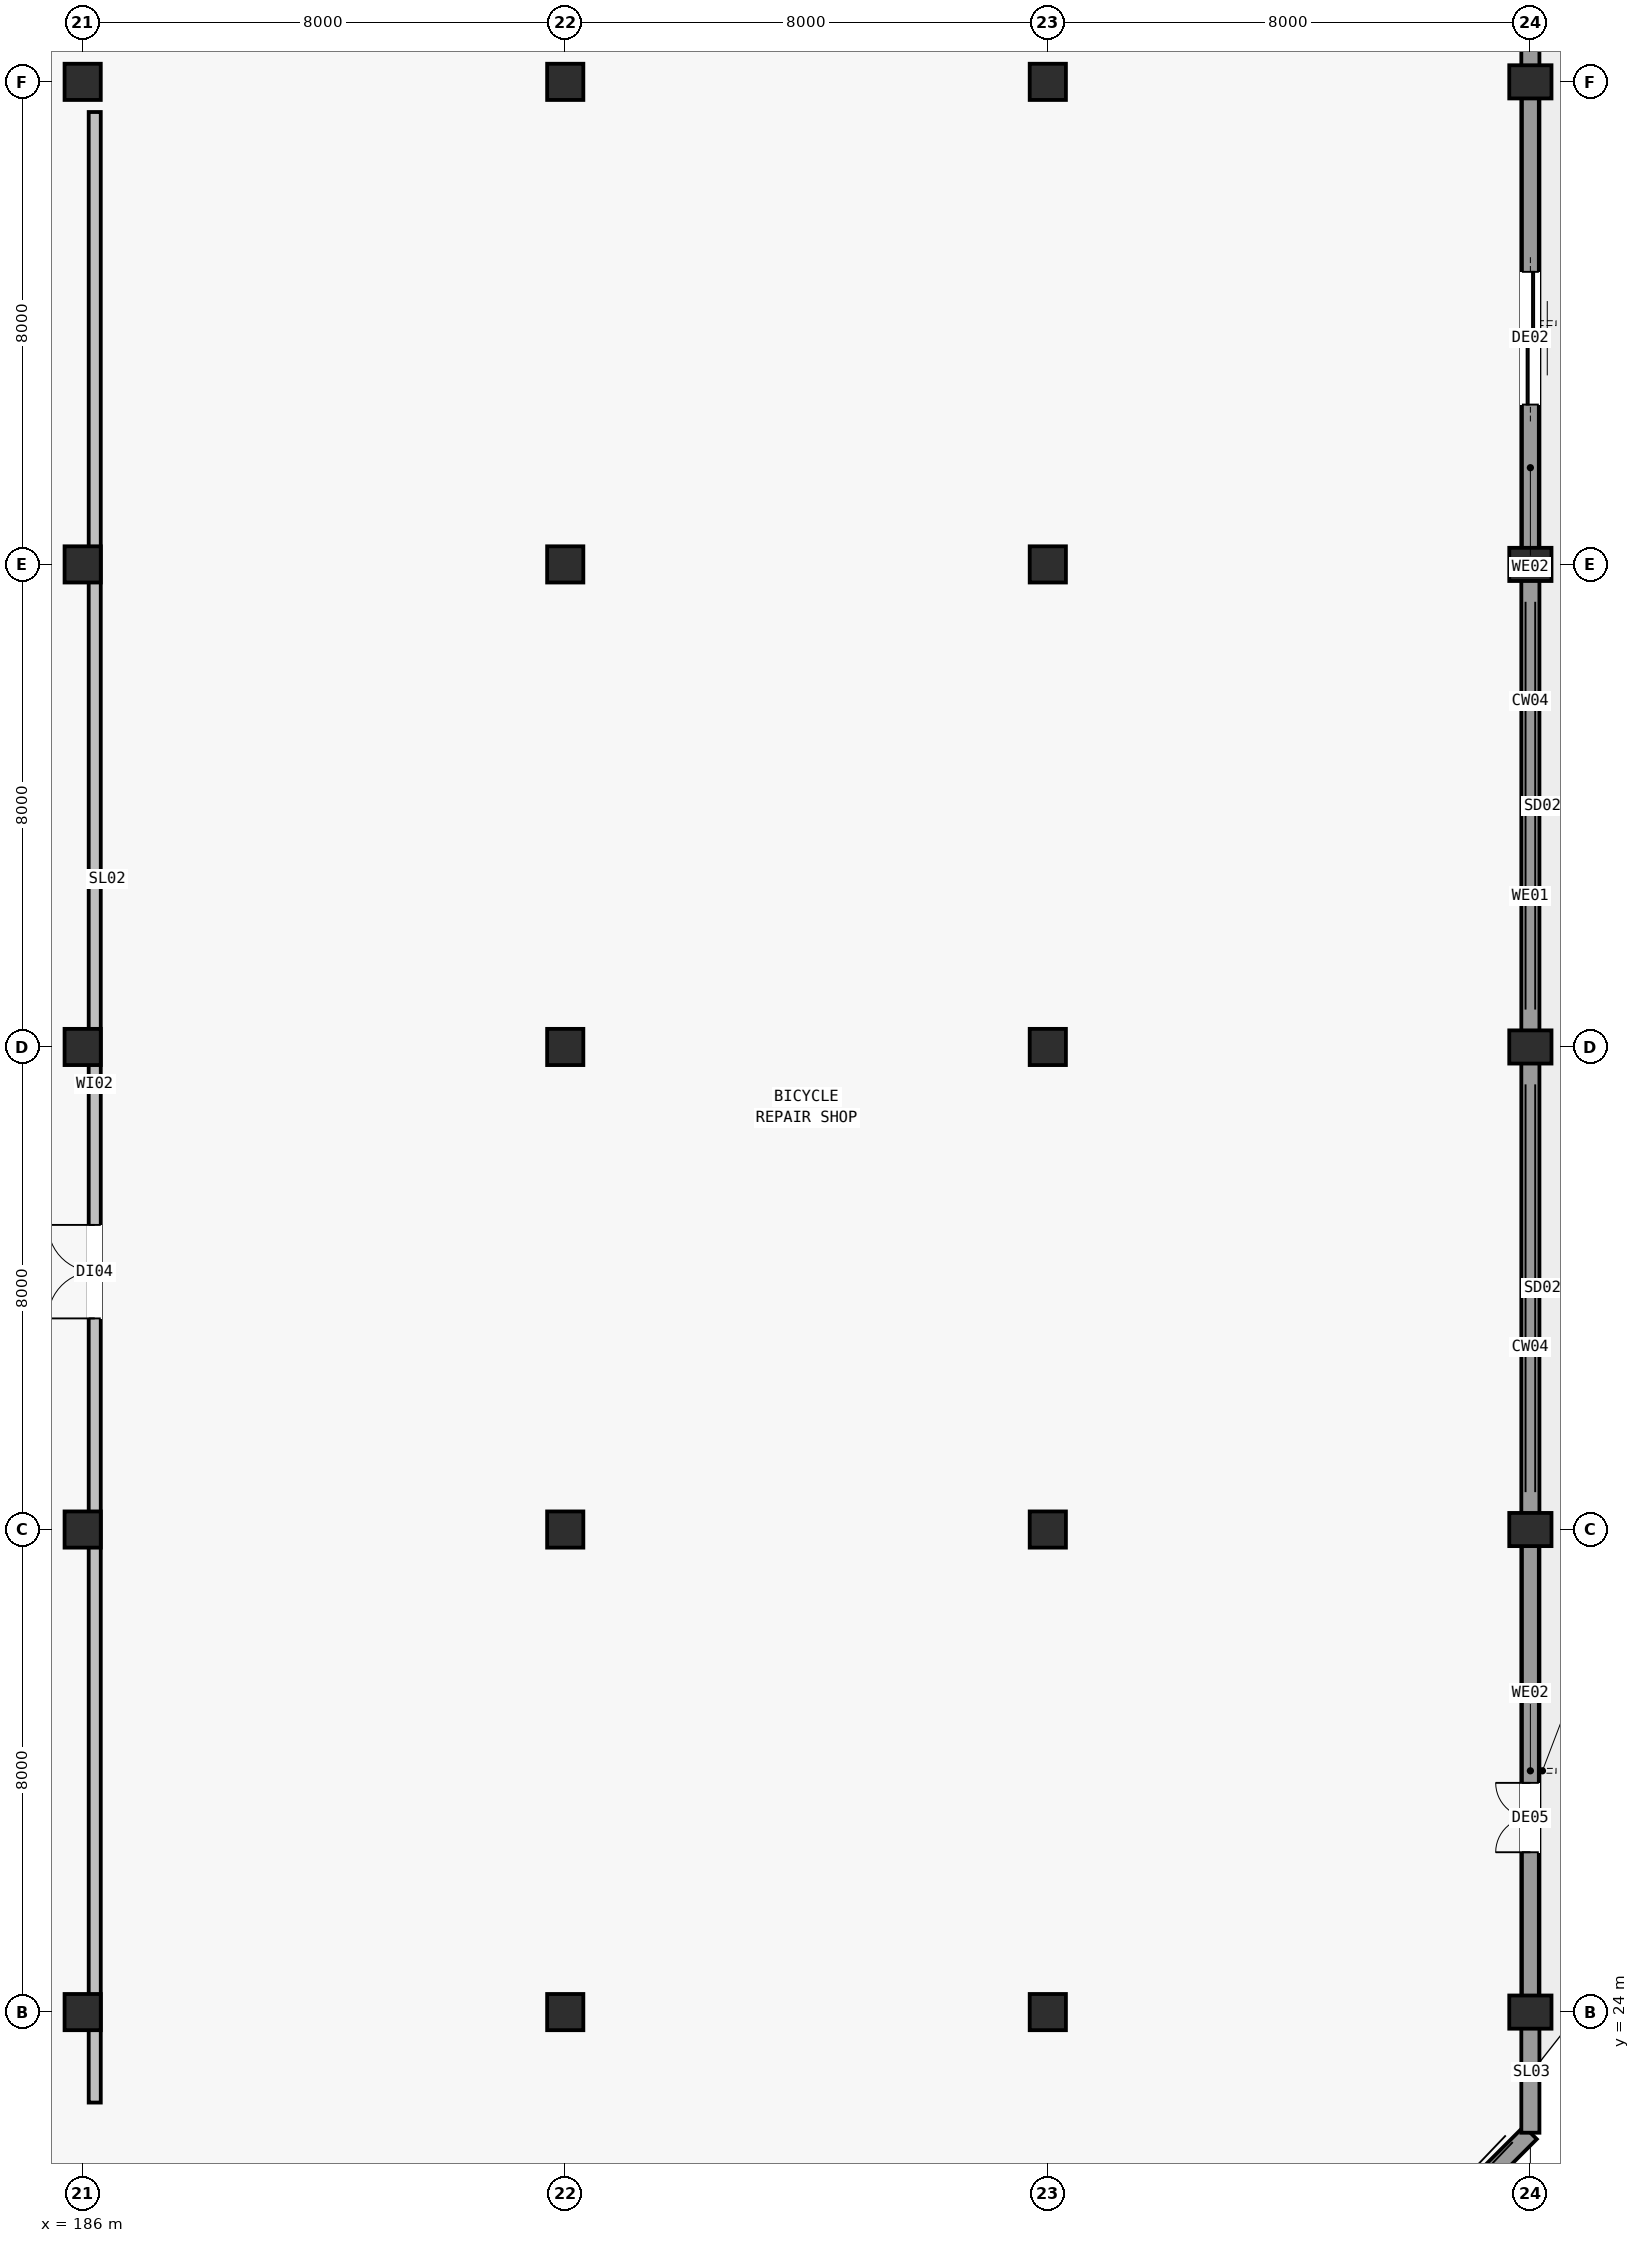
"""IFC4 building model, lengths in metres.
Left out: names, types, materials, properties, quantities, classifications, styles, units other than length and angle.
Written with IfcOpenShell. Run it as: python <this file> out.ifc"""

import sys

from ifc_helpers import new_model, si_unit, direction, frame, frame_2d, origin, origin_2d, place, context, subcontext, project, spatial, rectangle, extrude, element, fill, save


model = new_model("IFC4")
c1 = context("Model", 3, precision=1e-05, world=origin(), true_north=direction((0.0, 1.0)))
c2 = subcontext(c1, "Body", "Model", "MODEL_VIEW")
j1 = project(units=[si_unit("LENGTHUNIT", "METRE"), si_unit("PLANEANGLEUNIT", "RADIAN")], contexts=[c1])
p1 = place(None, origin())
s1 = spatial("IfcSite", under=j1, at=p1, CompositionType="ELEMENT")
p2 = place(p1, origin())
s2 = spatial("IfcBuilding", under=s1, at=p2, CompositionType="ELEMENT")
p3 = place(p2, origin())
s3 = spatial("IfcBuildingStorey", under=s2, at=p3, CompositionType="ELEMENT", Elevation=0.0)
for number, where, z_axis, x_axis in (
    (1, (186.0, 24.0, -0.9), (0.0, 0.0, 1.0), (1.0, 0.0, 0.0)),
    (2, (186.0, 32.0, -0.9), (0.0, 0.0, 1.0), (1.0, 0.0, 0.0)),
    (3, (186.0, 40.0, -0.9), (0.0, 0.0, 1.0), (1.0, 0.0, 0.0)),
    (4, (186.0, 48.0, -0.9), (0.0, 0.0, 1.0), (1.0, 0.0, 0.0)),
    (5, (186.0, 56.0, -0.9), (0.0, 0.0, 1.0), (1.0, 0.0, 0.0)),
    (6, (194.0, 24.0, -0.9), (0.0, 0.0, 1.0), (1.0, 0.0, 0.0)),
    (7, (194.0, 32.0, -0.9), (0.0, 0.0, 1.0), (1.0, 0.0, 0.0)),
    (8, (194.0, 40.0, -0.9), (0.0, 0.0, 1.0), (1.0, 0.0, 0.0)),
    (9, (194.0, 48.0, -0.9), (0.0, 0.0, 1.0), (1.0, 0.0, 0.0)),
    (10, (194.0, 56.0, -0.9), (0.0, 0.0, 1.0), (1.0, 0.0, 0.0)),
    (11, (202.0, 24.0, -0.9), (0.0, 0.0, 1.0), (1.0, 0.0, 0.0)),
    (12, (202.0, 32.0, -0.9), (0.0, 0.0, 1.0), (1.0, 0.0, 0.0)),
    (13, (202.0, 40.0, -0.9), (0.0, 0.0, 1.0), (1.0, 0.0, 0.0)),
    (14, (202.0, 48.0, -0.9), (0.0, 0.0, 1.0), (1.0, 0.0, 0.0)),
    (15, (202.0, 56.0, -0.9), (0.0, 0.0, 1.0), (1.0, 0.0, 0.0)),
):
    element("IfcColumn", number, at=place(p3, frame(where, z_axis=z_axis, x_axis=x_axis)), inside=s3, PredefinedType="COLUMN", context=c2, shape_type="SweptSolid", body=[
        extrude(rectangle(XDim=0.6, YDim=0.6, at=origin_2d()), origin(), (0.0, 0.0, 1.0), 6.5),
    ])
for number, where, z_axis, x_axis in (
    (16, (210.0, 24.0, -0.9), (0.0, 0.0, 1.0), (1.0, 0.0, 0.0)),
    (17, (210.0, 32.0, -0.9), (0.0, 0.0, 1.0), (1.0, 0.0, 0.0)),
    (18, (210.0, 40.0, -0.9), (0.0, 0.0, 1.0), (1.0, 0.0, 0.0)),
    (19, (210.0, 48.0, -0.9), (0.0, 0.0, 1.0), (1.0, 0.0, 0.0)),
    (20, (210.0, 56.0, -0.9), (0.0, 0.0, 1.0), (1.0, 0.0, 0.0)),
):
    element("IfcColumn", number, at=place(p3, frame(where, z_axis=z_axis, x_axis=x_axis)), inside=s3, PredefinedType="COLUMN", context=c2, shape_type="SweptSolid", body=[
        extrude(rectangle(XDim=0.7, YDim=0.55, at=origin_2d()), origin(), (0.0, 0.0, 1.0), 6.5),
    ])
p4 = place(p3, frame((204.0, 16.0, -0.9), z_axis=(0.0, 0.0, 1.0), x_axis=(0.707106781187, 0.707106781187, 0.0)))
e21 = element("IfcWall", 21, at=p4, inside=s3, PredefinedType="STANDARD", context=c2, shape_type="SweptSolid", body=[
    extrude(rectangle(XDim=8.485, YDim=0.3, at=frame_2d((4.243, 0.0))), origin(), (0.0, 0.0, 1.0), 0.9),
])
p5 = place(p3, frame((210.0, 22.0, -0.9), z_axis=(0.0, 0.0, 1.0), x_axis=(0.0, 1.0, 0.0)))
e22 = element("IfcWall", 22, at=p5, inside=s3, PredefinedType="STANDARD", context=c2, shape_type="SweptSolid", body=[
    extrude(rectangle(XDim=40.6, YDim=0.3, at=frame_2d((20.3, 0.0))), origin(), (0.0, 0.0, 1.0), 0.9),
])
p6 = place(p3, frame((210.0, 24.255, 0.0), z_axis=(0.0, 0.0, 1.0), x_axis=(0.0, 1.0, 0.0)))
e23 = element("IfcWall", 23, at=p6, inside=s3, PredefinedType="STANDARD", context=c2, shape_type="SweptSolid", body=[
    extrude(rectangle(XDim=7.49, YDim=0.28, at=frame_2d((3.745, 0.0))), origin(), (0.0, 0.0, 1.0), 4.2),
])
p7 = place(p6, frame((2.395, 0.0, 0.0)))
e24 = element("IfcOpeningElement", 24, at=p7, cuts=e23, PredefinedType="OPENING", context=c2, shape_type="SweptSolid", body=[
    extrude(rectangle(XDim=1.15, YDim=2.2, at=frame_2d((0.575, 1.1))), frame((0.0, 0.15, 0.0), z_axis=(0.0, -1.0, 0.0), x_axis=(1.0, 0.0, 0.0)), (0.0, 0.0, 1.0), 0.3),
])
p8 = place(p3, frame((210.0, 48.255, 0.0), z_axis=(0.0, 0.0, 1.0), x_axis=(0.0, 1.0, 0.0)))
e25 = element("IfcWall", 25, at=p8, inside=s3, PredefinedType="STANDARD", context=c2, shape_type="SweptSolid", body=[
    extrude(rectangle(XDim=7.49, YDim=0.28, at=frame_2d((3.745, 0.0))), origin(), (0.0, 0.0, 1.0), 4.2),
])
p9 = place(p8, frame((2.395, 0.0, 0.0)))
e26 = element("IfcOpeningElement", 26, at=p9, cuts=e25, PredefinedType="OPENING", context=c2, shape_type="SweptSolid", body=[
    extrude(rectangle(XDim=2.2, YDim=2.4, at=frame_2d((1.1, 1.2))), frame((0.0, 0.15, 0.0), z_axis=(0.0, -1.0, 0.0), x_axis=(1.0, 0.0, 0.0)), (0.0, 0.0, 1.0), 0.3),
])
p10 = place(p3, frame((186.2, 22.5, 0.0), z_axis=(0.0, 0.0, 1.0), x_axis=(0.0, 1.0, 0.0)))
e27 = element("IfcWall", 27, at=p10, inside=s3, PredefinedType="PARTITIONING", context=c2, shape_type="SweptSolid", body=[
    extrude(rectangle(XDim=33.0, YDim=0.2, at=frame_2d((16.5, 0.0))), origin(), (0.0, 0.0, 1.0), 4.2),
])
p11 = place(p10, frame((13.0, 0.0, 0.0)))
e28 = element("IfcOpeningElement", 28, at=p11, cuts=e27, PredefinedType="OPENING", context=c2, shape_type="SweptSolid", body=[
    extrude(rectangle(XDim=1.55, YDim=2.2, at=frame_2d((0.775, 1.1))), frame((0.0, 0.11, 0.0), z_axis=(0.0, -1.0, 0.0), x_axis=(1.0, 0.0, 0.0)), (0.0, 0.0, 1.0), 0.22),
])
p12 = place(p7, origin())
e29 = element("IfcDoor", 29, at=p12, inside=s3, OperationType="DOUBLE_SWING_LEFT", PredefinedType="DOOR", context=c2, shape_type="SweptSolid", body=[
    extrude(rectangle(XDim=1.15, YDim=2.2, at=frame_2d((0.575, 1.1))), frame((0.0, 0.025, 0.0), z_axis=(0.0, -1.0, 0.0), x_axis=(1.0, 0.0, 0.0)), (0.0, 0.0, 1.0), 0.05),
])
fill(e24, e29)
p13 = place(p9, origin())
e30 = element("IfcDoor", 30, at=p13, inside=s3, OperationType="DOUBLE_SWING_LEFT", PredefinedType="DOOR", context=c2, shape_type="SweptSolid", body=[
    extrude(rectangle(XDim=2.2, YDim=2.4, at=frame_2d((1.1, 1.2))), frame((0.0, 0.025, 0.0), z_axis=(0.0, -1.0, 0.0), x_axis=(1.0, 0.0, 0.0)), (0.0, 0.0, 1.0), 0.05),
])
fill(e26, e30)
p14 = place(p11, origin())
e31 = element("IfcDoor", 31, at=p14, inside=s3, OperationType="DOUBLE_SWING_LEFT", PredefinedType="DOOR", context=c2, shape_type="SweptSolid", body=[
    extrude(rectangle(XDim=1.55, YDim=2.2, at=frame_2d((0.775, 1.1))), frame((0.0, 0.025, 0.0), z_axis=(0.0, -1.0, 0.0), x_axis=(1.0, 0.0, 0.0)), (0.0, 0.0, 1.0), 0.05),
])
fill(e28, e31)
save(model, sys.argv[1])
